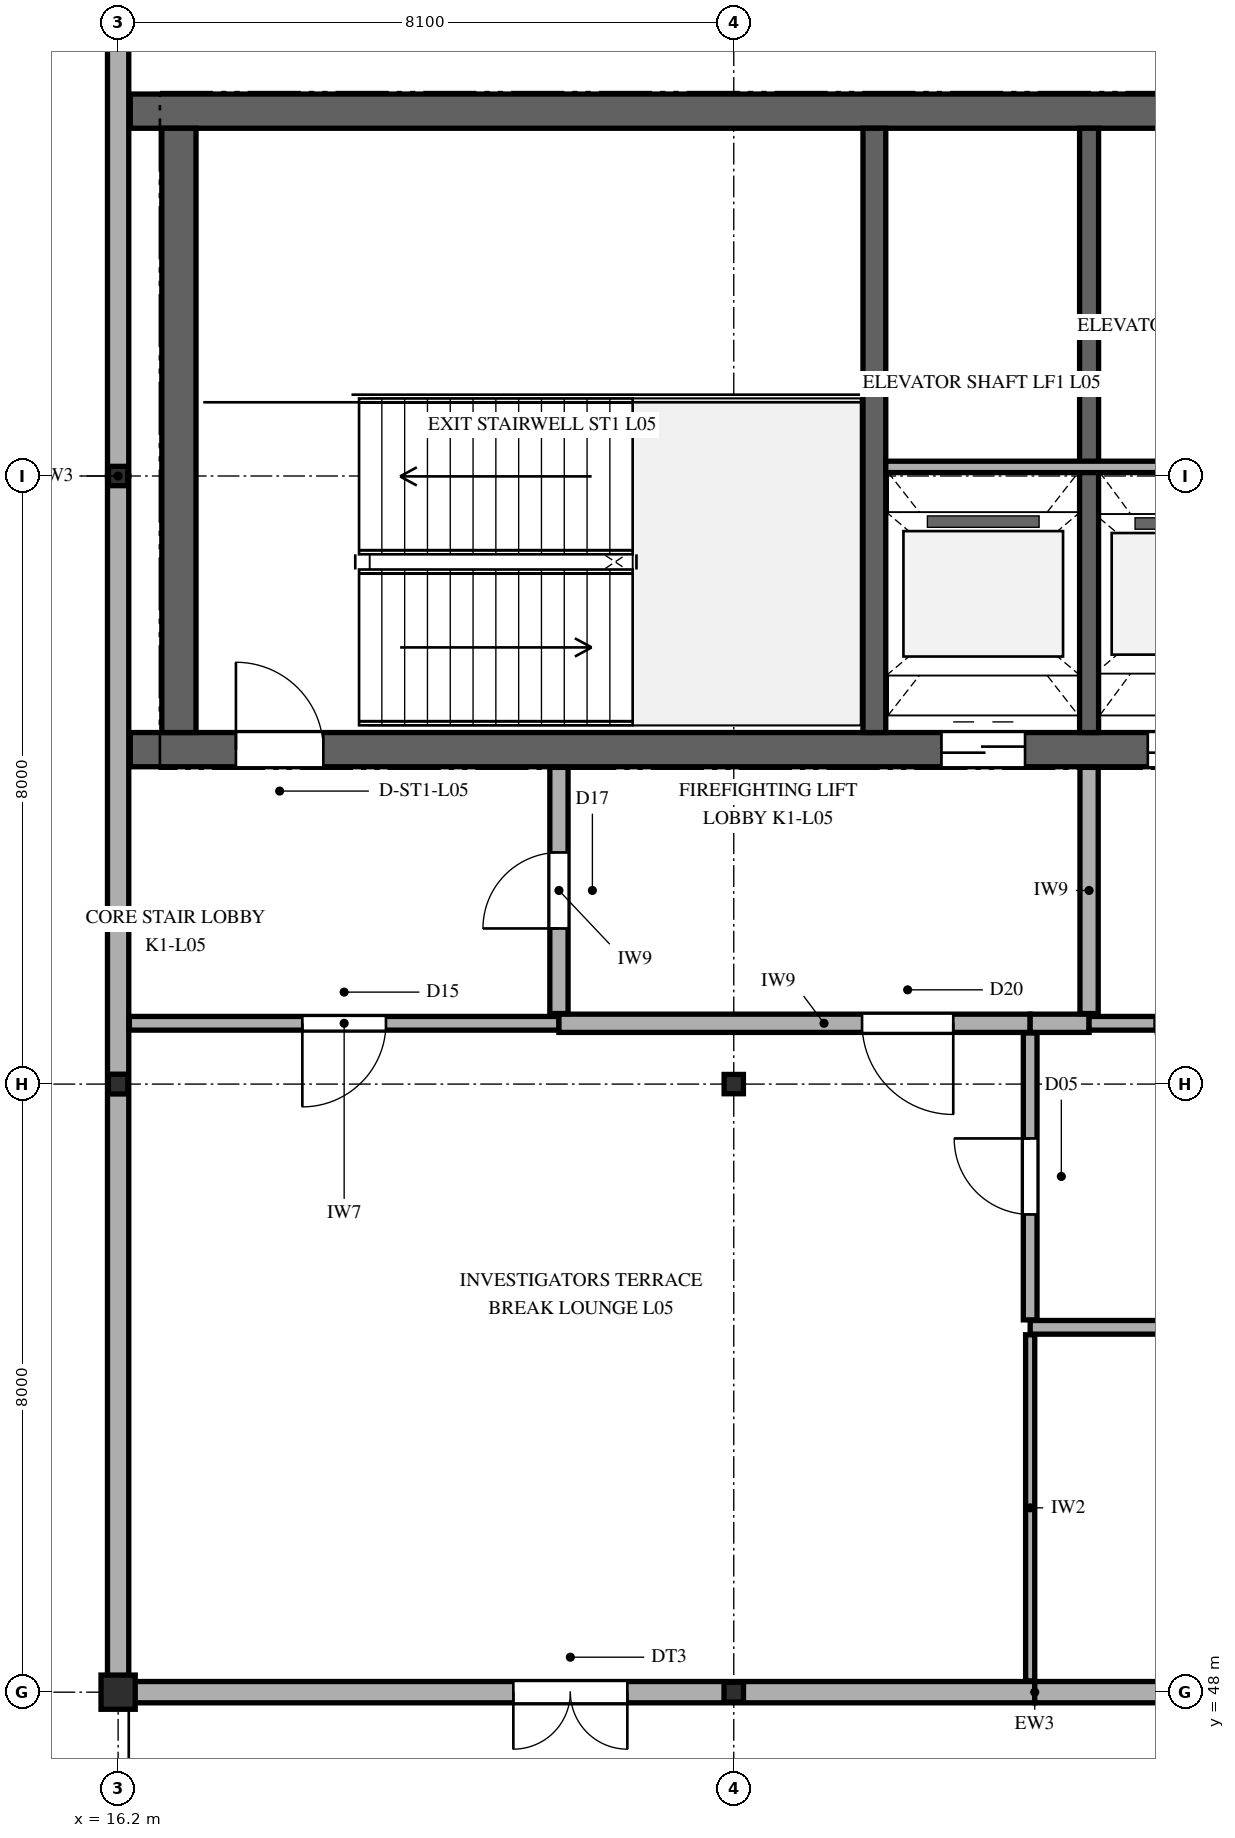
"""IFC4 building model, lengths in metres.
Left out: names, types, materials, properties, quantities, classifications, styles, units other than length and angle.
Written with IfcOpenShell. Run it as: python <this file> out.ifc"""

import sys

from ifc_helpers import new_model, si_unit, direction, frame, frame_2d, origin, origin_2d, place, context, subcontext, project, spatial, rectangle, hollow_rectangle, i_section, extrude, element, fill, save


model = new_model("IFC4")
c1 = context("Model", 3, precision=1e-05, world=origin(), true_north=direction((0.0, 1.0)))
c2 = subcontext(c1, "Body", "Model", "MODEL_VIEW")
j1 = project(units=[si_unit("LENGTHUNIT", "METRE"), si_unit("PLANEANGLEUNIT", "RADIAN")], contexts=[c1])
p1 = place(None, origin())
s1 = spatial("IfcSite", under=j1, at=p1, CompositionType="ELEMENT")
p2 = place(p1, origin())
s2 = spatial("IfcBuilding", under=s1, at=p2, CompositionType="ELEMENT")
p3 = place(p2, frame((0.0, 0.0, 24.9)))
s3 = spatial("IfcBuildingStorey", under=s2, at=p3, CompositionType="ELEMENT", Elevation=24.9)
p4 = place(p3, frame((16.36, 60.4, 0.0), z_axis=(0.0, 0.0, 1.0), x_axis=(1.0, 0.0, 0.0)))
e1 = element("IfcWall", 1, at=p4, inside=s3, PredefinedType="SHEAR", context=c2, shape_type="SweptSolid", body=[
    extrude(rectangle(XDim=15.665, YDim=0.45, at=frame_2d((7.833, 0.0))), origin(), (0.0, 0.0, 1.0), 4.2),
])
p5 = place(p4, frame((1.39, 0.0, 0.0)))
e2 = element("IfcOpeningElement", 2, at=p5, cuts=e1, PredefinedType="OPENING", context=c2, shape_type="SweptSolid", body=[
    extrude(rectangle(XDim=1.15, YDim=2.25, at=frame_2d((0.575, 1.125))), frame((0.0, 0.235, 0.0), z_axis=(0.0, -1.0, 0.0), x_axis=(1.0, 0.0, 0.0)), (0.0, 0.0, 1.0), 0.47),
])
p6 = place(p4, frame((10.673, 0.0, 0.0)))
e3 = element("IfcOpeningElement", 3, at=p6, cuts=e1, PredefinedType="OPENING", context=c2, shape_type="SweptSolid", body=[
    extrude(rectangle(XDim=1.1, YDim=2.2, at=frame_2d((0.55, 1.1))), frame((0.0, 0.235, 0.0), z_axis=(0.0, -1.0, 0.0), x_axis=(1.0, 0.0, 0.0)), (0.0, 0.0, 1.0), 0.47),
])
p7 = place(p4, frame((13.387, 0.0, 0.0)))
e4 = element("IfcOpeningElement", 4, at=p7, cuts=e1, PredefinedType="OPENING", context=c2, shape_type="SweptSolid", body=[
    extrude(rectangle(XDim=1.1, YDim=2.2, at=frame_2d((0.55, 1.1))), frame((0.0, 0.235, 0.0), z_axis=(0.0, -1.0, 0.0), x_axis=(1.0, 0.0, 0.0)), (0.0, 0.0, 1.0), 0.47),
])
p8 = place(p3, frame((16.36, 68.8, 0.0), z_axis=(0.0, 0.0, 1.0), x_axis=(1.0, 0.0, 0.0)))
e5 = element("IfcWall", 5, at=p8, inside=s3, PredefinedType="SHEAR", context=c2, shape_type="SweptSolid", body=[
    extrude(rectangle(XDim=15.665, YDim=0.45, at=frame_2d((7.833, 0.0))), origin(), (0.0, 0.0, 1.0), 4.2),
])
p9 = place(p3, frame((17.0, 60.625, 0.0), z_axis=(0.0, 0.0, 1.0), x_axis=(0.0, 1.0, 0.0)))
e6 = element("IfcWall", 6, at=p9, inside=s3, PredefinedType="SHEAR", context=c2, shape_type="SweptSolid", body=[
    extrude(rectangle(XDim=7.95, YDim=0.45, at=frame_2d((3.975, 0.0))), origin(), (0.0, 0.0, 1.0), 4.2),
])
p10 = place(p3, frame((26.15, 60.625, 0.0), z_axis=(0.0, 0.0, 1.0), x_axis=(0.0, 1.0, 0.0)))
e7 = element("IfcWall", 7, at=p10, inside=s3, PredefinedType="SHEAR", context=c2, shape_type="SweptSolid", body=[
    extrude(rectangle(XDim=7.95, YDim=0.3, at=frame_2d((3.975, 0.0))), origin(), (0.0, 0.0, 1.0), 4.2),
])
p11 = place(p3, frame((28.975, 60.625, 0.0), z_axis=(0.0, 0.0, 1.0), x_axis=(0.0, 1.0, 0.0)))
e8 = element("IfcWall", 8, at=p11, inside=s3, PredefinedType="SHEAR", context=c2, shape_type="SweptSolid", body=[
    extrude(rectangle(XDim=7.95, YDim=0.25, at=frame_2d((3.975, 0.0))), origin(), (0.0, 0.0, 1.0), 4.2),
])
p12 = place(p3, frame((16.2, 48.0, 0.0), z_axis=(0.0, 0.0, 1.0), x_axis=(1.0, 0.0, 0.0)))
e9 = element("IfcColumn", 9, at=p12, inside=s3, PredefinedType="COLUMN", context=c2, shape_type="SweptSolid", body=[
    extrude(rectangle(XDim=0.45, YDim=0.45, at=origin_2d()), origin(), (0.0, 0.0, 1.0), 3.86),
])
p13 = place(p3, frame((16.2, 56.0, 0.0), z_axis=(0.0, 0.0, 1.0), x_axis=(1.0, 0.0, 0.0)))
e10 = element("IfcColumn", 10, at=p13, inside=s3, PredefinedType="COLUMN", context=c2, shape_type="SweptSolid", body=[
    extrude(i_section(OverallWidth=0.256, OverallDepth=0.26, WebThickness=0.011, FlangeThickness=0.017, FilletRadius=0.013, at=origin_2d()), origin(), (0.0, 0.0, 1.0), 4.2),
])
p14 = place(p3, frame((16.2, 64.0, 0.0), z_axis=(0.0, 0.0, 1.0), x_axis=(1.0, 0.0, 0.0)))
e11 = element("IfcColumn", 11, at=p14, inside=s3, PredefinedType="COLUMN", context=c2, shape_type="SweptSolid", body=[
    extrude(hollow_rectangle(XDim=0.254, YDim=0.254, WallThickness=0.013, InnerFilletRadius=0.013, OuterFilletRadius=0.025, at=origin_2d()), origin(), (0.0, 0.0, 1.0), 4.2),
])
p15 = place(p3, frame((24.3, 48.0, 0.0), z_axis=(0.0, 0.0, 1.0), x_axis=(1.0, 0.0, 0.0)))
e12 = element("IfcColumn", 12, at=p15, inside=s3, PredefinedType="COLUMN", context=c2, shape_type="SweptSolid", body=[
    extrude(i_section(OverallWidth=0.256, OverallDepth=0.26, WebThickness=0.011, FlangeThickness=0.017, FilletRadius=0.013, at=origin_2d()), origin(), (0.0, 0.0, 1.0), 3.86),
])
p16 = place(p3, frame((24.3, 56.0, 0.0), z_axis=(0.0, 0.0, 1.0), x_axis=(1.0, 0.0, 0.0)))
e13 = element("IfcColumn", 13, at=p16, inside=s3, PredefinedType="COLUMN", context=c2, shape_type="SweptSolid", body=[
    extrude(hollow_rectangle(XDim=0.254, YDim=0.254, WallThickness=0.013, InnerFilletRadius=0.013, OuterFilletRadius=0.025, at=origin_2d()), origin(), (0.0, 0.0, 1.0), 4.2),
])
p17 = place(p3, frame((16.2, 80.0, 0.0), z_axis=(0.0, 0.0, 1.0), x_axis=(0.0, -1.0, 0.0)))
e14 = element("IfcWall", 14, at=p17, inside=s3, PredefinedType="SOLIDWALL", context=c2, shape_type="SweptSolid", body=[
    extrude(rectangle(XDim=16.0, YDim=0.28, at=frame_2d((8.0, 0.0))), origin(), (0.0, 0.0, 1.0), 3.452),
])
p18 = place(p3, frame((16.2, 64.0, 0.0), z_axis=(0.0, 0.0, 1.0), x_axis=(0.0, -1.0, 0.0)))
e15 = element("IfcWall", 15, at=p18, inside=s3, PredefinedType="SOLIDWALL", context=c2, shape_type="SweptSolid", body=[
    extrude(rectangle(XDim=16.0, YDim=0.28, at=frame_2d((8.0, 0.0))), origin(), (0.0, 0.0, 1.0), 3.352),
])
p19 = place(p3, frame((16.2, 48.0, 0.0), z_axis=(0.0, 0.0, 1.0), x_axis=(1.0, 0.0, 0.0)))
e16 = element("IfcWall", 16, at=p19, inside=s3, PredefinedType="SOLIDWALL", context=c2, shape_type="SweptSolid", body=[
    extrude(rectangle(XDim=12.06, YDim=0.28, at=frame_2d((6.03, 0.0))), origin(), (0.0, 0.0, 1.0), 3.302),
])
p20 = place(p19, frame((5.2, 0.0, 0.0)))
e17 = element("IfcOpeningElement", 17, at=p20, cuts=e16, PredefinedType="OPENING", context=c2, shape_type="SweptSolid", body=[
    extrude(rectangle(XDim=1.5, YDim=2.3, at=frame_2d((0.75, 1.15))), frame((0.0, 0.15, 0.0), z_axis=(0.0, -1.0, 0.0), x_axis=(1.0, 0.0, 0.0)), (0.0, 0.0, 1.0), 0.3),
])
p21 = place(p3, frame((28.26, 48.0, 0.0), z_axis=(0.0, 0.0, 1.0), x_axis=(1.0, 0.0, 0.0)))
e18 = element("IfcWall", 18, at=p21, inside=s3, PredefinedType="SOLIDWALL", context=c2, shape_type="SweptSolid", body=[
    extrude(rectangle(XDim=12.06, YDim=0.28, at=frame_2d((6.03, 0.0))), origin(), (0.0, 0.0, 1.0), 3.302),
])
p22 = place(p21, frame((6.3, 0.0, 0.95)))
e19 = element("IfcOpeningElement", 19, at=p22, cuts=e18, PredefinedType="OPENING", context=c2, shape_type="SweptSolid", body=[
    extrude(rectangle(XDim=3.6, YDim=0.9, at=frame_2d((1.8, 0.45))), frame((0.0, 0.15, 0.0), z_axis=(0.0, -1.0, 0.0), x_axis=(1.0, 0.0, 0.0)), (0.0, 0.0, 1.0), 0.3),
])
p23 = place(p3, frame((26.3, 64.12, 0.0), z_axis=(0.0, 0.0, 1.0), x_axis=(1.0, 0.0, 0.0)))
e20 = element("IfcWall", 20, at=p23, inside=s3, PredefinedType="PARTITIONING", context=c2, shape_type="SweptSolid", body=[
    extrude(rectangle(XDim=5.25, YDim=0.15, at=frame_2d((2.625, 0.0))), origin(), (0.0, 0.0, 1.0), 3.96),
])
p24 = place(p3, frame((16.348, 56.8, 0.0), z_axis=(0.0, 0.0, 1.0), x_axis=(1.0, 0.0, 0.0)))
e21 = element("IfcWall", 21, at=p24, inside=s3, PredefinedType="PARTITIONING", context=c2, shape_type="SweptSolid", body=[
    extrude(rectangle(XDim=5.652, YDim=0.18, at=frame_2d((2.826, 0.0))), origin(), (0.0, 0.0, 1.0), 3.96),
])
p25 = place(p24, frame((2.276, 0.0, 0.0)))
e22 = element("IfcOpeningElement", 22, at=p25, cuts=e21, PredefinedType="OPENING", context=c2, shape_type="SweptSolid", body=[
    extrude(rectangle(XDim=1.1, YDim=2.2, at=frame_2d((0.55, 1.1))), frame((0.0, 0.1, 0.0), z_axis=(0.0, -1.0, 0.0), x_axis=(1.0, 0.0, 0.0)), (0.0, 0.0, 1.0), 0.2),
])
p26 = place(p3, frame((22.0, 56.8, 0.0), z_axis=(0.0, 0.0, 1.0), x_axis=(1.0, 0.0, 0.0)))
e23 = element("IfcWall", 23, at=p26, inside=s3, PredefinedType="PARTITIONING", context=c2, shape_type="SweptSolid", body=[
    extrude(rectangle(XDim=6.2, YDim=0.24, at=frame_2d((3.1, 0.0))), origin(), (0.0, 0.0, 1.0), 3.96),
])
p27 = place(p26, frame((3.988, 0.0, 0.0)))
e24 = element("IfcOpeningElement", 24, at=p27, cuts=e23, PredefinedType="OPENING", context=c2, shape_type="SweptSolid", body=[
    extrude(rectangle(XDim=1.2, YDim=2.3, at=frame_2d((0.6, 1.15))), frame((0.0, 0.13, 0.0), z_axis=(0.0, -1.0, 0.0), x_axis=(1.0, 0.0, 0.0)), (0.0, 0.0, 1.0), 0.26),
])
p28 = place(p3, frame((28.2, 52.8, 0.0), z_axis=(0.0, 0.0, 1.0), x_axis=(1.0, 0.0, 0.0)))
e25 = element("IfcWall", 25, at=p28, inside=s3, PredefinedType="PARTITIONING", context=c2, shape_type="SweptSolid", body=[
    extrude(rectangle(XDim=8.0, YDim=0.18, at=frame_2d((4.0, 0.0))), origin(), (0.0, 0.0, 1.0), 3.96),
])
p29 = place(p28, frame((3.5, 0.0, 0.0)))
e26 = element("IfcOpeningElement", 26, at=p29, cuts=e25, PredefinedType="OPENING", context=c2, shape_type="SweptSolid", body=[
    extrude(rectangle(XDim=1.0, YDim=2.2, at=frame_2d((0.5, 1.1))), frame((0.0, 0.1, 0.0), z_axis=(0.0, -1.0, 0.0), x_axis=(1.0, 0.0, 0.0)), (0.0, 0.0, 1.0), 0.2),
])
p30 = place(p3, frame((28.2, 56.8, 0.0), z_axis=(0.0, 0.0, 1.0), x_axis=(1.0, 0.0, 0.0)))
e27 = element("IfcWall", 27, at=p30, inside=s3, PredefinedType="PARTITIONING", context=c2, shape_type="SweptSolid", body=[
    extrude(rectangle(XDim=0.775, YDim=0.24, at=frame_2d((0.388, 0.0))), origin(), (0.0, 0.0, 1.0), 3.96),
])
p31 = place(p3, frame((28.975, 56.8, 0.0), z_axis=(0.0, 0.0, 1.0), x_axis=(1.0, 0.0, 0.0)))
e28 = element("IfcWall", 28, at=p31, inside=s3, PredefinedType="PARTITIONING", context=c2, shape_type="SweptSolid", body=[
    extrude(rectangle(XDim=2.825, YDim=0.18, at=frame_2d((1.413, 0.0))), origin(), (0.0, 0.0, 1.0), 3.96),
])
p32 = place(p31, frame((0.863, 0.0, 0.0)))
e29 = element("IfcOpeningElement", 29, at=p32, cuts=e28, PredefinedType="OPENING", context=c2, shape_type="SweptSolid", body=[
    extrude(rectangle(XDim=1.1, YDim=2.2, at=frame_2d((0.55, 1.1))), frame((0.0, 0.1, 0.0), z_axis=(0.0, -1.0, 0.0), x_axis=(1.0, 0.0, 0.0)), (0.0, 0.0, 1.0), 0.2),
])
p33 = place(p3, frame((22.0, 56.928, 0.0), z_axis=(0.0, 0.0, 1.0), x_axis=(0.0, 1.0, 0.0)))
e30 = element("IfcWall", 30, at=p33, inside=s3, PredefinedType="PARTITIONING", context=c2, shape_type="SweptSolid", body=[
    extrude(rectangle(XDim=3.239, YDim=0.24, at=frame_2d((1.62, 0.0))), origin(), (0.0, 0.0, 1.0), 3.96),
])
p34 = place(p33, frame((1.119, 0.0, 0.0)))
e31 = element("IfcOpeningElement", 31, at=p34, cuts=e30, PredefinedType="OPENING", context=c2, shape_type="SweptSolid", body=[
    extrude(rectangle(XDim=1.0, YDim=2.2, at=frame_2d((0.5, 1.1))), frame((0.0, 0.13, 0.0), z_axis=(0.0, -1.0, 0.0), x_axis=(1.0, 0.0, 0.0)), (0.0, 0.0, 1.0), 0.26),
])
p35 = place(p3, frame((28.2, 48.148, 0.0), z_axis=(0.0, 0.0, 1.0), x_axis=(0.0, 1.0, 0.0)))
e32 = element("IfcWall", 32, at=p35, inside=s3, PredefinedType="PARTITIONING", context=c2, shape_type="SweptSolid", body=[
    extrude(rectangle(XDim=4.554, YDim=0.12, at=frame_2d((2.277, 0.0))), origin(), (0.0, 0.0, 1.0), 3.498),
])
p36 = place(p3, frame((28.2, 52.898, 0.0), z_axis=(0.0, 0.0, 1.0), x_axis=(0.0, 1.0, 0.0)))
e33 = element("IfcWall", 33, at=p36, inside=s3, PredefinedType="PARTITIONING", context=c2, shape_type="SweptSolid", body=[
    extrude(rectangle(XDim=3.774, YDim=0.18, at=frame_2d((1.887, 0.0))), origin(), (0.0, 0.0, 1.0), 3.498),
])
p37 = place(p36, frame((1.387, 0.0, 0.0)))
e34 = element("IfcOpeningElement", 34, at=p37, cuts=e33, PredefinedType="OPENING", context=c2, shape_type="SweptSolid", body=[
    extrude(rectangle(XDim=1.0, YDim=2.2, at=frame_2d((0.5, 1.1))), frame((0.0, 0.1, 0.0), z_axis=(0.0, -1.0, 0.0), x_axis=(1.0, 0.0, 0.0)), (0.0, 0.0, 1.0), 0.2),
])
p38 = place(p3, frame((28.975, 56.928, 0.0), z_axis=(0.0, 0.0, 1.0), x_axis=(0.0, 1.0, 0.0)))
e35 = element("IfcWall", 35, at=p38, inside=s3, PredefinedType="PARTITIONING", context=c2, shape_type="SweptSolid", body=[
    extrude(rectangle(XDim=3.239, YDim=0.24, at=frame_2d((1.62, 0.0))), origin(), (0.0, 0.0, 1.0), 3.96),
])
p39 = place(p20, frame((1.5, 0.0, 0.0), z_axis=(0.0, 0.0, 1.0), x_axis=(-1.0, 0.0, 0.0)))
e36 = element("IfcDoor", 36, at=p39, inside=s3, OperationType="DOUBLE_DOOR_SINGLE_SWING", PredefinedType="DOOR", context=c2, shape_type="SweptSolid", body=[
    extrude(rectangle(XDim=1.5, YDim=2.3, at=frame_2d((0.75, 1.15))), frame((0.0, 0.025, 0.0), z_axis=(0.0, -1.0, 0.0), x_axis=(1.0, 0.0, 0.0)), (0.0, 0.0, 1.0), 0.05),
])
fill(e17, e36)
p40 = place(p5, origin())
e37 = element("IfcDoor", 37, at=p40, inside=s3, OperationType="SINGLE_SWING_LEFT", PredefinedType="DOOR", context=c2, shape_type="SweptSolid", body=[
    extrude(rectangle(XDim=1.15, YDim=2.25, at=frame_2d((0.575, 1.125))), frame((0.0, 0.025, 0.0), z_axis=(0.0, -1.0, 0.0), x_axis=(1.0, 0.0, 0.0)), (0.0, 0.0, 1.0), 0.05),
])
fill(e2, e37)
p41 = place(p6, frame((1.1, 0.0, 0.0), z_axis=(0.0, 0.0, 1.0), x_axis=(-1.0, 0.0, 0.0)))
e38 = element("IfcDoor", 38, at=p41, inside=s3, OperationType="DOUBLE_DOOR_SLIDING", PredefinedType="DOOR", context=c2, shape_type="SweptSolid", body=[
    extrude(rectangle(XDim=1.1, YDim=2.2, at=frame_2d((0.55, 1.1))), frame((0.0, 0.025, 0.0), z_axis=(0.0, -1.0, 0.0), x_axis=(1.0, 0.0, 0.0)), (0.0, 0.0, 1.0), 0.05),
])
fill(e3, e38)
p42 = place(p7, frame((1.1, 0.0, 0.0), z_axis=(0.0, 0.0, 1.0), x_axis=(-1.0, 0.0, 0.0)))
e39 = element("IfcDoor", 39, at=p42, inside=s3, OperationType="DOUBLE_DOOR_SLIDING", PredefinedType="DOOR", context=c2, shape_type="SweptSolid", body=[
    extrude(rectangle(XDim=1.1, YDim=2.2, at=frame_2d((0.55, 1.1))), frame((0.0, 0.025, 0.0), z_axis=(0.0, -1.0, 0.0), x_axis=(1.0, 0.0, 0.0)), (0.0, 0.0, 1.0), 0.05),
])
fill(e4, e39)
p43 = place(p25, frame((1.1, 0.0, 0.0), z_axis=(0.0, 0.0, 1.0), x_axis=(-1.0, 0.0, 0.0)))
e40 = element("IfcDoor", 40, at=p43, inside=s3, OperationType="SINGLE_SWING_LEFT", PredefinedType="DOOR", context=c2, shape_type="SweptSolid", body=[
    extrude(rectangle(XDim=1.1, YDim=2.2, at=frame_2d((0.55, 1.1))), frame((0.0, 0.025, 0.0), z_axis=(0.0, -1.0, 0.0), x_axis=(1.0, 0.0, 0.0)), (0.0, 0.0, 1.0), 0.05),
])
fill(e22, e40)
p44 = place(p27, frame((1.2, 0.0, 0.0), z_axis=(0.0, 0.0, 1.0), x_axis=(-1.0, 0.0, 0.0)))
e41 = element("IfcDoor", 41, at=p44, inside=s3, OperationType="SINGLE_SWING_RIGHT", PredefinedType="DOOR", context=c2, shape_type="SweptSolid", body=[
    extrude(rectangle(XDim=1.2, YDim=2.3, at=frame_2d((0.6, 1.15))), frame((0.0, 0.025, 0.0), z_axis=(0.0, -1.0, 0.0), x_axis=(1.0, 0.0, 0.0)), (0.0, 0.0, 1.0), 0.05),
])
fill(e24, e41)
p45 = place(p32, frame((1.1, 0.0, 0.0), z_axis=(0.0, 0.0, 1.0), x_axis=(-1.0, 0.0, 0.0)))
e42 = element("IfcDoor", 42, at=p45, inside=s3, OperationType="SINGLE_SWING_RIGHT", PredefinedType="DOOR", context=c2, shape_type="SweptSolid", body=[
    extrude(rectangle(XDim=1.1, YDim=2.2, at=frame_2d((0.55, 1.1))), frame((0.0, 0.025, 0.0), z_axis=(0.0, -1.0, 0.0), x_axis=(1.0, 0.0, 0.0)), (0.0, 0.0, 1.0), 0.05),
])
fill(e29, e42)
p46 = place(p34, origin())
e43 = element("IfcDoor", 43, at=p46, inside=s3, OperationType="SINGLE_SWING_LEFT", PredefinedType="DOOR", context=c2, shape_type="SweptSolid", body=[
    extrude(rectangle(XDim=1.0, YDim=2.2, at=frame_2d((0.5, 1.1))), frame((0.0, 0.025, 0.0), z_axis=(0.0, -1.0, 0.0), x_axis=(1.0, 0.0, 0.0)), (0.0, 0.0, 1.0), 0.05),
])
fill(e31, e43)
p47 = place(p37, origin())
e44 = element("IfcDoor", 44, at=p47, inside=s3, OperationType="SINGLE_SWING_RIGHT", PredefinedType="DOOR", context=c2, shape_type="SweptSolid", body=[
    extrude(rectangle(XDim=1.0, YDim=2.2, at=frame_2d((0.5, 1.1))), frame((0.0, 0.025, 0.0), z_axis=(0.0, -1.0, 0.0), x_axis=(1.0, 0.0, 0.0)), (0.0, 0.0, 1.0), 0.05),
])
fill(e34, e44)
save(model, sys.argv[1])
